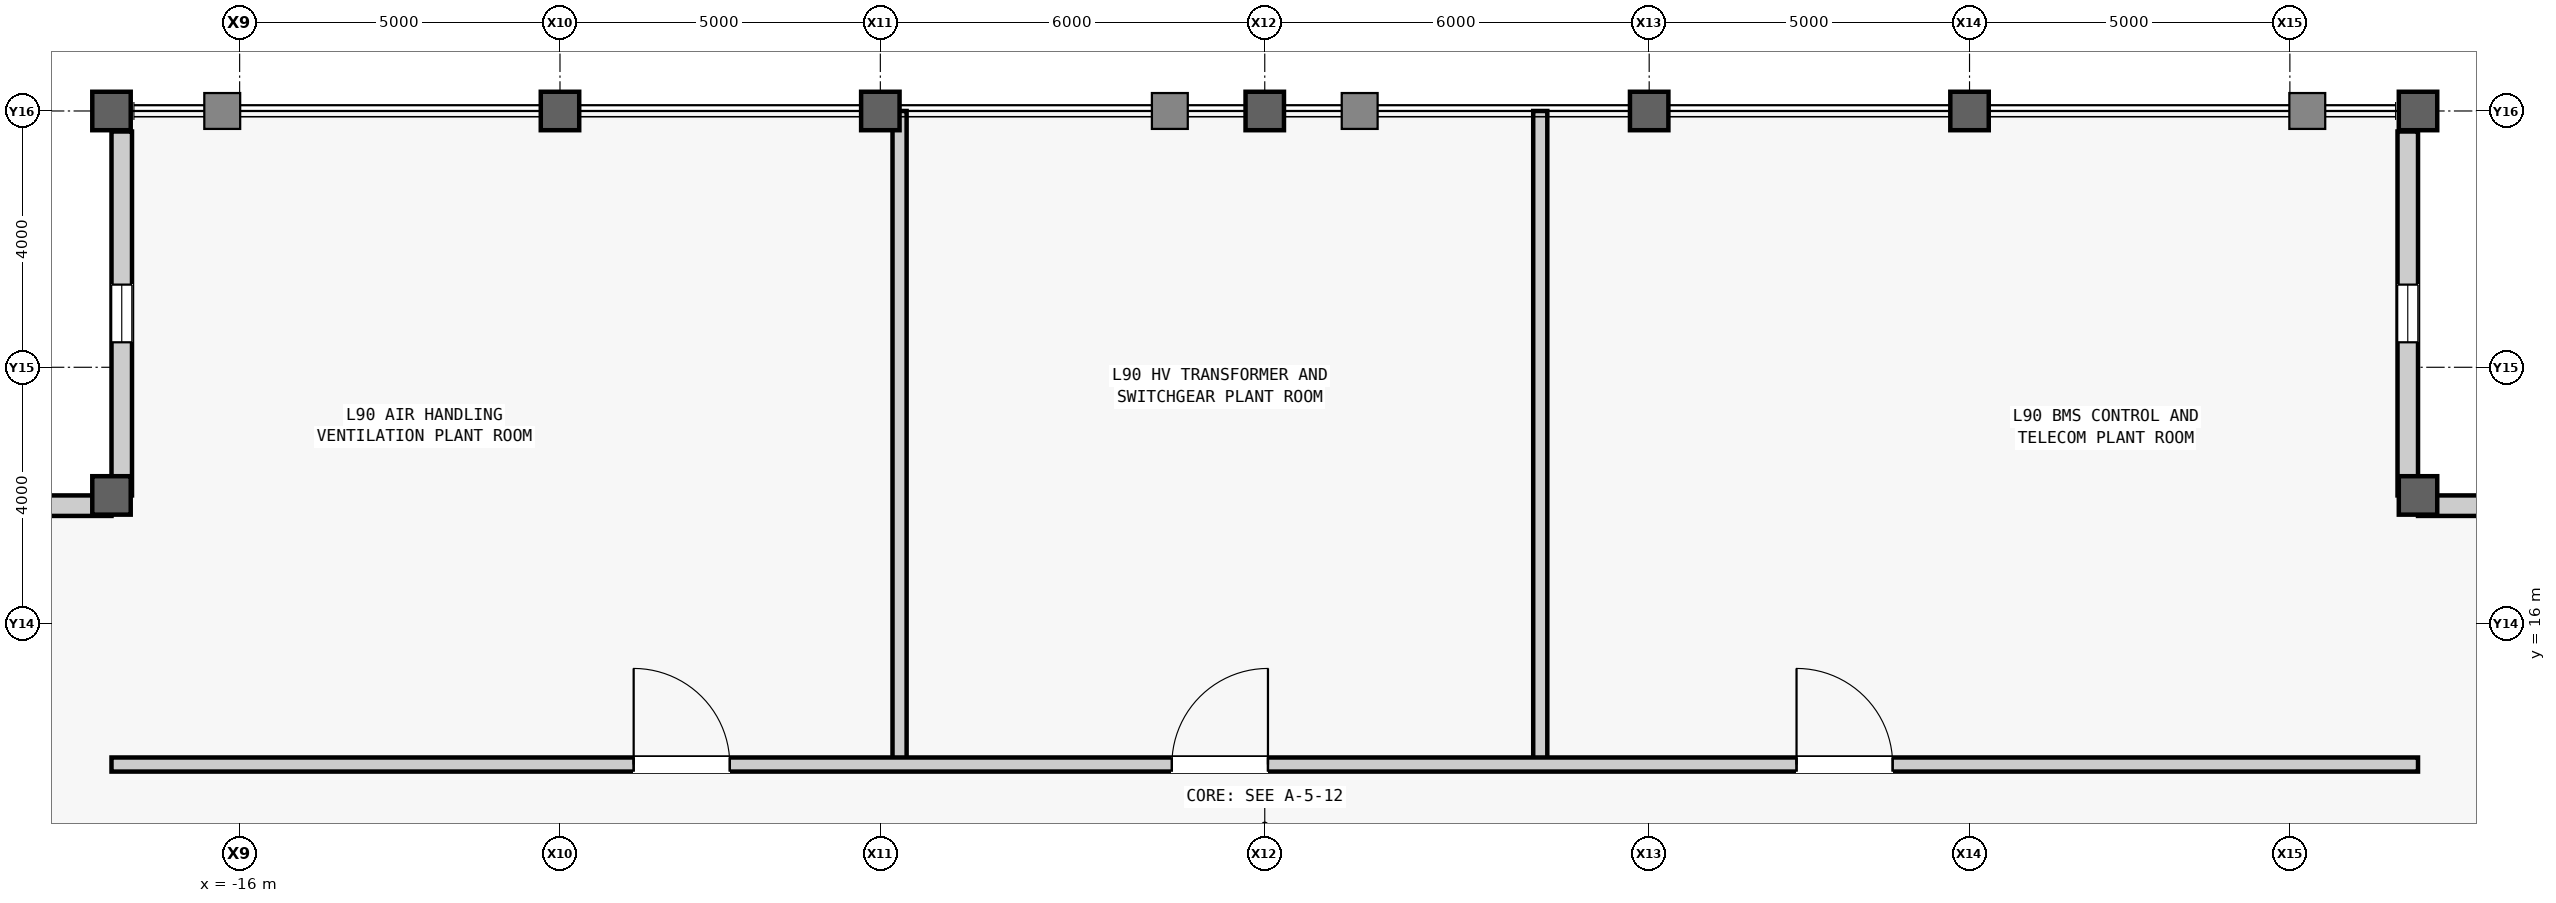
"""IFC4 building model, lengths in metres.
Left out: names, types, materials, properties, quantities, classifications, styles, units other than length and angle.
Written with IfcOpenShell. Run it as: python <this file> out.ifc"""

import sys

from ifc_helpers import new_model, si_unit, direction, frame, frame_2d, origin, origin_2d, place, context, subcontext, project, spatial, rectangle, hollow_rectangle, extrude, source, transform, mapped, element, fill, save


model = new_model("IFC4")
c1 = context("Model", 3, precision=1e-05, world=origin(), true_north=direction((0.0, 1.0)))
c2 = subcontext(c1, "Body", "Model", "MODEL_VIEW")
j1 = project(units=[si_unit("LENGTHUNIT", "METRE"), si_unit("PLANEANGLEUNIT", "RADIAN")], contexts=[c1])
p1 = place(None, origin())
s1 = spatial("IfcSite", under=j1, at=p1, CompositionType="ELEMENT")
p2 = place(p1, origin())
s2 = spatial("IfcBuilding", under=s1, at=p2, CompositionType="ELEMENT")
p3 = place(p2, frame((0.0, 0.0, 380.3)))
s3 = spatial("IfcBuildingStorey", under=s2, at=p3, CompositionType="ELEMENT", Elevation=380.3)
m1 = source(origin(), c2, "Body", "SweptSolid", [
    extrude(hollow_rectangle(XDim=0.6, YDim=0.6, WallThickness=0.035, at=origin_2d()), origin(), (0.0, 0.0, 1.0), 4.8),
])
for number, where, z_axis, x_axis in (
    (1, (-18.0, 18.0, 0.0), (0.0, 0.0, 1.0), (1.0, 0.0, 0.0)),
    (2, (-18.0, 24.0, 0.0), (0.0, 0.0, 1.0), (1.0, 0.0, 0.0)),
    (3, (-11.0, 24.0, 0.0), (0.0, 0.0, 1.0), (1.0, 0.0, 0.0)),
    (4, (-6.0, 24.0, 0.0), (0.0, 0.0, 1.0), (1.0, 0.0, 0.0)),
    (5, (0.0, 24.0, 0.0), (0.0, 0.0, 1.0), (1.0, 0.0, 0.0)),
    (6, (6.0, 24.0, 0.0), (0.0, 0.0, 1.0), (1.0, 0.0, 0.0)),
    (7, (11.0, 24.0, 0.0), (0.0, 0.0, 1.0), (1.0, 0.0, 0.0)),
    (8, (18.0, 18.0, 0.0), (0.0, 0.0, 1.0), (1.0, 0.0, 0.0)),
    (9, (18.0, 24.0, 0.0), (0.0, 0.0, 1.0), (1.0, 0.0, 0.0)),
):
    element("IfcColumn", number, at=place(p3, frame(where, z_axis=z_axis, x_axis=x_axis)), inside=s3, PredefinedType="COLUMN", context=c2, shape_type="MappedRepresentation", body=[
        mapped(m1, transform((0.0, 0.0, 0.0), scale=1.0)),
    ])
m2 = source(origin(), c2, "Body", "SweptSolid", [
    extrude(rectangle(XDim=5.68, YDim=0.32, at=frame_2d((2.84, 0.0))), origin(), (0.0, 0.0, 1.0), 3.901),
])
p4 = place(p3, frame((18.0, 17.84, 0.0), z_axis=(0.0, 0.0, 1.0), x_axis=(1.0, 0.0, 0.0)))
e10 = element("IfcWall", 10, at=p4, inside=s3, PredefinedType="STANDARD", context=c2, shape_type="MappedRepresentation", body=[
    mapped(m2, transform((0.0, 0.0, 0.0), scale=1.0)),
])
m3 = source(origin(), c2, "Body", "SweptSolid", [
    extrude(rectangle(XDim=0.9, YDim=2.4, at=frame_2d((0.45, 1.2))), frame((0.0, 0.17, 0.0), z_axis=(0.0, -1.0, 0.0), x_axis=(1.0, 0.0, 0.0)), (0.0, 0.0, 1.0), 0.34),
])
p5 = place(p4, frame((2.39, 0.0, 0.7)))
e11 = element("IfcOpeningElement", 11, at=p5, cuts=e10, PredefinedType="OPENING", context=c2, shape_type="MappedRepresentation", body=[
    mapped(m3, transform((0.0, 0.0, 0.0), scale=1.0)),
])
p6 = place(p3, frame((17.84, 18.0, 0.0), z_axis=(0.0, 0.0, 1.0), x_axis=(0.0, 1.0, 0.0)))
e12 = element("IfcWall", 12, at=p6, inside=s3, PredefinedType="STANDARD", context=c2, shape_type="MappedRepresentation", body=[
    mapped(m2, transform((0.0, 0.0, 0.0), scale=1.0)),
])
p7 = place(p6, frame((2.39, 0.0, 0.7)))
e13 = element("IfcOpeningElement", 13, at=p7, cuts=e12, PredefinedType="OPENING", context=c2, shape_type="MappedRepresentation", body=[
    mapped(m3, transform((0.0, 0.0, 0.0), scale=1.0)),
])
p8 = place(p3, frame((-17.84, 18.0, 0.0), z_axis=(0.0, 0.0, 1.0), x_axis=(0.0, 1.0, 0.0)))
e14 = element("IfcWall", 14, at=p8, inside=s3, PredefinedType="STANDARD", context=c2, shape_type="MappedRepresentation", body=[
    mapped(m2, transform((0.0, 0.0, 0.0), scale=1.0)),
])
p9 = place(p8, frame((2.39, 0.0, 0.7)))
e15 = element("IfcOpeningElement", 15, at=p9, cuts=e14, PredefinedType="OPENING", context=c2, shape_type="MappedRepresentation", body=[
    mapped(m3, transform((0.0, 0.0, 0.0), scale=1.0)),
])
p10 = place(p3, frame((-18.0, 17.84, 0.0), z_axis=(0.0, 0.0, 1.0), x_axis=(-1.0, 0.0, 0.0)))
e16 = element("IfcWall", 16, at=p10, inside=s3, PredefinedType="STANDARD", context=c2, shape_type="MappedRepresentation", body=[
    mapped(m2, transform((0.0, 0.0, 0.0), scale=1.0)),
])
p11 = place(p10, frame((2.39, 0.0, 0.7)))
e17 = element("IfcOpeningElement", 17, at=p11, cuts=e16, PredefinedType="OPENING", context=c2, shape_type="MappedRepresentation", body=[
    mapped(m3, transform((0.0, 0.0, 0.0), scale=1.0)),
])
m4 = source(origin(), c2, "Body", "SweptSolid", [
    extrude(rectangle(XDim=10.2, YDim=0.22, at=frame_2d((5.1, 0.0))), origin(), (0.0, 0.0, 1.0), 4.45),
])
for number, where, z_axis, x_axis in (
    (18, (-5.7, 13.8, 0.0), (0.0, 0.0, 1.0), (0.0, 1.0, 0.0)),
    (19, (4.3, 13.8, 0.0), (0.0, 0.0, 1.0), (0.0, 1.0, 0.0)),
):
    element("IfcWall", number, at=place(p3, frame(where, z_axis=z_axis, x_axis=x_axis)), inside=s3, PredefinedType="PARTITIONING", context=c2, shape_type="MappedRepresentation", body=[
        mapped(m4, transform((0.0, 0.0, 0.0), scale=1.0)),
    ])
m5 = source(origin(), c2, "Body", "SweptSolid", [
    extrude(rectangle(XDim=36.0, YDim=0.22, at=frame_2d((18.0, 0.0))), origin(), (0.0, 0.0, 1.0), 4.45),
])
p12 = place(p3, frame((-18.0, 13.8, 0.0), z_axis=(0.0, 0.0, 1.0), x_axis=(1.0, 0.0, 0.0)))
e20 = element("IfcWall", 20, at=p12, inside=s3, PredefinedType="PARTITIONING", context=c2, shape_type="MappedRepresentation", body=[
    mapped(m5, transform((0.0, 0.0, 0.0), scale=1.0)),
])
m6 = source(origin(), c2, "Body", "SweptSolid", [
    extrude(rectangle(XDim=1.5, YDim=2.3, at=frame_2d((0.75, 1.15))), frame((0.0, 0.12, 0.0), z_axis=(0.0, -1.0, 0.0), x_axis=(1.0, 0.0, 0.0)), (0.0, 0.0, 1.0), 0.24),
])
p13 = place(p12, frame((8.15, 0.0, 0.0)))
e21 = element("IfcOpeningElement", 21, at=p13, cuts=e20, PredefinedType="OPENING", context=c2, shape_type="MappedRepresentation", body=[
    mapped(m6, transform((0.0, 0.0, 0.0), scale=1.0)),
])
p14 = place(p12, frame((16.55, 0.0, 0.0)))
e22 = element("IfcOpeningElement", 22, at=p14, cuts=e20, PredefinedType="OPENING", context=c2, shape_type="MappedRepresentation", body=[
    mapped(m6, transform((0.0, 0.0, 0.0), scale=1.0)),
])
p15 = place(p12, frame((26.3, 0.0, 0.0)))
e23 = element("IfcOpeningElement", 23, at=p15, cuts=e20, PredefinedType="OPENING", context=c2, shape_type="MappedRepresentation", body=[
    mapped(m6, transform((0.0, 0.0, 0.0), scale=1.0)),
])
m7 = source(origin(), c2, "Body", "SweptSolid", [
    extrude(rectangle(XDim=0.9, YDim=2.4, at=frame_2d((0.45, 1.2))), frame((0.0, 0.03, 0.0), z_axis=(0.0, -1.0, 0.0), x_axis=(1.0, 0.0, 0.0)), (0.0, 0.0, 1.0), 0.06),
])
p16 = place(p7, origin())
e24 = element("IfcWindow", 24, at=p16, inside=s3, PartitioningType="SINGLE_PANEL", PredefinedType="WINDOW", context=c2, shape_type="MappedRepresentation", body=[
    mapped(m7, transform((0.0, 0.0, 0.0), scale=1.0)),
])
fill(e13, e24)
p17 = place(p9, origin())
e25 = element("IfcWindow", 25, at=p17, inside=s3, PartitioningType="SINGLE_PANEL", PredefinedType="WINDOW", context=c2, shape_type="MappedRepresentation", body=[
    mapped(m7, transform((0.0, 0.0, 0.0), scale=1.0)),
])
fill(e15, e25)
m8 = source(origin(), c2, "Body", "SweptSolid", [
    extrude(rectangle(XDim=1.5, YDim=2.3, at=frame_2d((0.75, 1.15))), frame((0.0, 0.025, 0.0), z_axis=(0.0, -1.0, 0.0), x_axis=(1.0, 0.0, 0.0)), (0.0, 0.0, 1.0), 0.05),
])
p18 = place(p13, origin())
e26 = element("IfcDoor", 26, at=p18, inside=s3, OperationType="SINGLE_SWING_LEFT", PredefinedType="DOOR", context=c2, shape_type="MappedRepresentation", body=[
    mapped(m8, transform((0.0, 0.0, 0.0), scale=1.0)),
])
fill(e21, e26)
p19 = place(p14, origin())
e27 = element("IfcDoor", 27, at=p19, inside=s3, OperationType="SINGLE_SWING_RIGHT", PredefinedType="DOOR", context=c2, shape_type="MappedRepresentation", body=[
    mapped(m8, transform((0.0, 0.0, 0.0), scale=1.0)),
])
fill(e22, e27)
p20 = place(p15, origin())
e28 = element("IfcDoor", 28, at=p20, inside=s3, OperationType="SINGLE_SWING_LEFT", PredefinedType="DOOR", context=c2, shape_type="MappedRepresentation", body=[
    mapped(m8, transform((0.0, 0.0, 0.0), scale=1.0)),
])
fill(e23, e28)
save(model, sys.argv[1])
